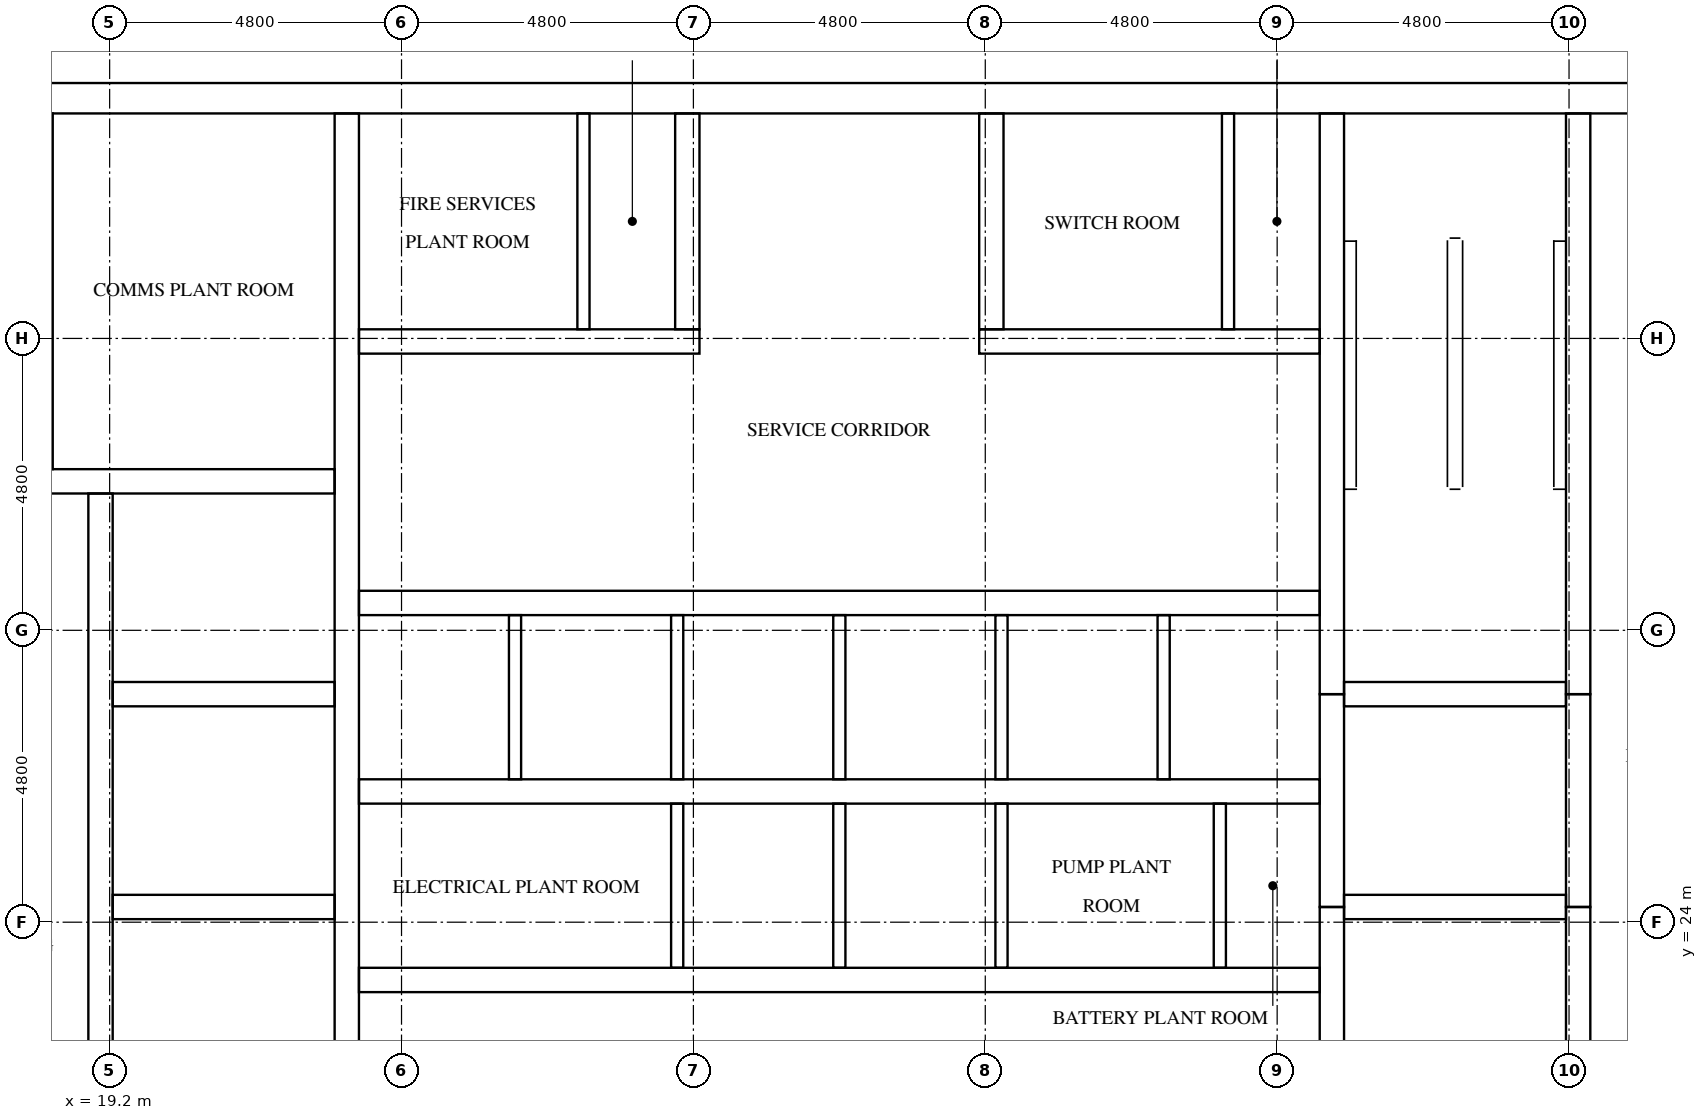
"""IFC4 building model, lengths in metres.
Left out: names, types, materials, properties, quantities, classifications, styles, units other than length and angle.
Written with IfcOpenShell. Run it as: python <this file> out.ifc"""

import sys

from ifc_helpers import new_model, si_unit, direction, frame, frame_2d, origin, place, context, subcontext, project, spatial, rectangle, extrude, element, fill, save


model = new_model("IFC4")
c1 = context("Model", 3, precision=1e-05, world=origin(), true_north=direction((0.0, 1.0)))
c2 = subcontext(c1, "Body", "Model", "MODEL_VIEW")
j1 = project(units=[si_unit("LENGTHUNIT", "METRE"), si_unit("PLANEANGLEUNIT", "RADIAN")], contexts=[c1])
p1 = place(None, origin())
s1 = spatial("IfcSite", under=j1, at=p1, CompositionType="ELEMENT")
p2 = place(p1, origin())
s2 = spatial("IfcBuilding", under=s1, at=p2, CompositionType="ELEMENT")
p3 = place(p2, frame((0.0, 0.0, 296.3)))
s3 = spatial("IfcBuildingStorey", under=s2, at=p3, CompositionType="ELEMENT", Elevation=296.3)
p4 = place(p3, frame((15.0, 37.55, 0.0), z_axis=(0.0, 0.0, 1.0), x_axis=(1.0, 0.0, 0.0)))
e1 = element("IfcWall", 1, at=p4, inside=s3, PredefinedType="SHEAR", context=c2, shape_type="SweptSolid", body=[
    extrude(rectangle(XDim=32.4, YDim=0.5, at=frame_2d((16.2, 0.0))), origin(), (0.0, 0.0, 1.0), 4.4),
])
p5 = place(p4, frame((15.3, 0.0, 0.0)))
e2 = element("IfcOpeningElement", 2, at=p5, cuts=e1, PredefinedType="OPENING", context=c2, shape_type="SweptSolid", body=[
    extrude(rectangle(XDim=1.8, YDim=2.1, at=frame_2d((0.9, 1.05))), frame((0.0, 0.26, 0.0), z_axis=(0.0, -1.0, 0.0), x_axis=(1.0, 0.0, 0.0)), (0.0, 0.0, 1.0), 0.52),
])
p6 = place(p4, frame((1.282, 0.0, 0.0)))
e3 = element("IfcOpeningElement", 3, at=p6, cuts=e1, PredefinedType="OPENING", context=c2, shape_type="SweptSolid", body=[
    extrude(rectangle(XDim=1.0, YDim=2.1, at=frame_2d((0.5, 1.05))), frame((0.0, 0.26, 0.0), z_axis=(0.0, -1.0, 0.0), x_axis=(1.0, 0.0, 0.0)), (0.0, 0.0, 1.0), 0.52),
])
p7 = place(p4, frame((5.082, 0.0, 0.0)))
e4 = element("IfcOpeningElement", 4, at=p7, cuts=e1, PredefinedType="OPENING", context=c2, shape_type="SweptSolid", body=[
    extrude(rectangle(XDim=1.0, YDim=2.1, at=frame_2d((0.5, 1.05))), frame((0.0, 0.26, 0.0), z_axis=(0.0, -1.0, 0.0), x_axis=(1.0, 0.0, 0.0)), (0.0, 0.0, 1.0), 0.52),
])
p8 = place(p3, frame((19.05, 15.5, 0.0), z_axis=(0.0, 0.0, 1.0), x_axis=(0.0, 1.0, 0.0)))
e5 = element("IfcWall", 5, at=p8, inside=s3, PredefinedType="SHEAR", context=c2, shape_type="SweptSolid", body=[
    extrude(rectangle(XDim=15.55, YDim=0.4, at=frame_2d((7.775, 0.0))), origin(), (0.0, 0.0, 1.0), 4.4),
])
p9 = place(p8, frame((9.95, 0.0, 0.0)))
e6 = element("IfcOpeningElement", 6, at=p9, cuts=e5, PredefinedType="OPENING", context=c2, shape_type="SweptSolid", body=[
    extrude(rectangle(XDim=1.1, YDim=2.1, at=frame_2d((0.55, 1.05))), frame((0.0, 0.21, 0.0), z_axis=(0.0, -1.0, 0.0), x_axis=(1.0, 0.0, 0.0)), (0.0, 0.0, 1.0), 0.42),
])
p10 = place(p8, frame((13.45, 0.0, 0.0)))
e7 = element("IfcOpeningElement", 7, at=p10, cuts=e5, PredefinedType="OPENING", context=c2, shape_type="SweptSolid", body=[
    extrude(rectangle(XDim=1.1, YDim=2.1, at=frame_2d((0.55, 1.05))), frame((0.0, 0.21, 0.0), z_axis=(0.0, -1.0, 0.0), x_axis=(1.0, 0.0, 0.0)), (0.0, 0.0, 1.0), 0.42),
])
p11 = place(p8, frame((0.7, 0.0, 0.0)))
e8 = element("IfcOpeningElement", 8, at=p11, cuts=e5, PredefinedType="OPENING", context=c2, shape_type="SweptSolid", body=[
    extrude(rectangle(XDim=1.2, YDim=2.1, at=frame_2d((0.6, 1.05))), frame((0.0, 0.21, 0.0), z_axis=(0.0, -1.0, 0.0), x_axis=(1.0, 0.0, 0.0)), (0.0, 0.0, 1.0), 0.42),
])
p12 = place(p3, frame((23.1, 15.5, 0.0), z_axis=(0.0, 0.0, 1.0), x_axis=(0.0, 1.0, 0.0)))
e9 = element("IfcWall", 9, at=p12, inside=s3, PredefinedType="SHEAR", context=c2, shape_type="SweptSolid", body=[
    extrude(rectangle(XDim=21.8, YDim=0.4, at=frame_2d((10.9, 0.0))), origin(), (0.0, 0.0, 1.0), 4.4),
])
p13 = place(p3, frame((39.3, 15.5, 0.0), z_axis=(0.0, 0.0, 1.0), x_axis=(0.0, 1.0, 0.0)))
e10 = element("IfcWall", 10, at=p13, inside=s3, PredefinedType="SHEAR", context=c2, shape_type="SweptSolid", body=[
    extrude(rectangle(XDim=8.75, YDim=0.4, at=frame_2d((4.375, 0.0))), origin(), (0.0, 0.0, 1.0), 4.4),
])
p14 = place(p3, frame((39.3, 24.25, 0.0), z_axis=(0.0, 0.0, 1.0), x_axis=(0.0, 1.0, 0.0)))
e11 = element("IfcWall", 11, at=p14, inside=s3, PredefinedType="SHEAR", context=c2, shape_type="SweptSolid", body=[
    extrude(rectangle(XDim=3.5, YDim=0.4, at=frame_2d((1.75, 0.0))), origin(), (0.0, 0.0, 1.0), 4.4),
])
p15 = place(p3, frame((39.3, 27.75, 0.0), z_axis=(0.0, 0.0, 1.0), x_axis=(0.0, 1.0, 0.0)))
e12 = element("IfcWall", 12, at=p15, inside=s3, PredefinedType="SHEAR", context=c2, shape_type="SweptSolid", body=[
    extrude(rectangle(XDim=9.55, YDim=0.4, at=frame_2d((4.775, 0.0))), origin(), (0.0, 0.0, 1.0), 4.4),
])
p16 = place(p3, frame((43.35, 15.5, 0.0), z_axis=(0.0, 0.0, 1.0), x_axis=(0.0, 1.0, 0.0)))
e13 = element("IfcWall", 13, at=p16, inside=s3, PredefinedType="SHEAR", context=c2, shape_type="SweptSolid", body=[
    extrude(rectangle(XDim=8.75, YDim=0.4, at=frame_2d((4.375, 0.0))), origin(), (0.0, 0.0, 1.0), 4.4),
])
p17 = place(p16, frame((0.7, 0.0, 0.0)))
e14 = element("IfcOpeningElement", 14, at=p17, cuts=e13, PredefinedType="OPENING", context=c2, shape_type="SweptSolid", body=[
    extrude(rectangle(XDim=1.2, YDim=2.1, at=frame_2d((0.6, 1.05))), frame((0.0, 0.21, 0.0), z_axis=(0.0, -1.0, 0.0), x_axis=(1.0, 0.0, 0.0)), (0.0, 0.0, 1.0), 0.42),
])
p18 = place(p3, frame((43.35, 24.25, 0.0), z_axis=(0.0, 0.0, 1.0), x_axis=(0.0, 1.0, 0.0)))
e15 = element("IfcWall", 15, at=p18, inside=s3, PredefinedType="SHEAR", context=c2, shape_type="SweptSolid", body=[
    extrude(rectangle(XDim=3.5, YDim=0.4, at=frame_2d((1.75, 0.0))), origin(), (0.0, 0.0, 1.0), 4.4),
])
p19 = place(p18, frame((1.2, 0.0, 0.0)))
e16 = element("IfcOpeningElement", 16, at=p19, cuts=e15, PredefinedType="OPENING", context=c2, shape_type="SweptSolid", body=[
    extrude(rectangle(XDim=1.1, YDim=2.1, at=frame_2d((0.55, 1.05))), frame((0.0, 0.21, 0.0), z_axis=(0.0, -1.0, 0.0), x_axis=(1.0, 0.0, 0.0)), (0.0, 0.0, 1.0), 0.42),
])
p20 = place(p3, frame((43.35, 27.75, 0.0), z_axis=(0.0, 0.0, 1.0), x_axis=(0.0, 1.0, 0.0)))
e17 = element("IfcWall", 17, at=p20, inside=s3, PredefinedType="SHEAR", context=c2, shape_type="SweptSolid", body=[
    extrude(rectangle(XDim=9.55, YDim=0.4, at=frame_2d((4.775, 0.0))), origin(), (0.0, 0.0, 1.0), 4.4),
])
p21 = place(p20, frame((7.65, 0.0, 0.0)))
e18 = element("IfcOpeningElement", 18, at=p21, cuts=e17, PredefinedType="OPENING", context=c2, shape_type="SweptSolid", body=[
    extrude(rectangle(XDim=1.2, YDim=2.1, at=frame_2d((0.6, 1.05))), frame((0.0, 0.21, 0.0), z_axis=(0.0, -1.0, 0.0), x_axis=(1.0, 0.0, 0.0)), (0.0, 0.0, 1.0), 0.42),
])
for number, where, z_axis, x_axis in (
    (19, (19.25, 24.25, 0.0), (0.0, 0.0, 1.0), (1.0, 0.0, 0.0)),
    (20, (19.25, 27.75, 0.0), (0.0, 0.0, 1.0), (1.0, 0.0, 0.0)),
):
    element("IfcWall", number, at=place(p3, frame(where, z_axis=z_axis, x_axis=x_axis)), inside=s3, PredefinedType="SHEAR", context=c2, shape_type="SweptSolid", body=[
        extrude(rectangle(XDim=3.65, YDim=0.4, at=frame_2d((1.825, 0.0))), origin(), (0.0, 0.0, 1.0), 4.4),
    ])
p22 = place(p3, frame((15.5, 31.25, 0.0), z_axis=(0.0, 0.0, 1.0), x_axis=(1.0, 0.0, 0.0)))
e21 = element("IfcWall", 21, at=p22, inside=s3, PredefinedType="SHEAR", context=c2, shape_type="SweptSolid", body=[
    extrude(rectangle(XDim=7.4, YDim=0.4, at=frame_2d((3.7, 0.0))), origin(), (0.0, 0.0, 1.0), 4.4),
])
for number, where, z_axis, x_axis in (
    (22, (39.5, 24.25, 0.0), (0.0, 0.0, 1.0), (1.0, 0.0, 0.0)),
    (23, (39.5, 27.75, 0.0), (0.0, 0.0, 1.0), (1.0, 0.0, 0.0)),
):
    element("IfcWall", number, at=place(p3, frame(where, z_axis=z_axis, x_axis=x_axis)), inside=s3, PredefinedType="SHEAR", context=c2, shape_type="SweptSolid", body=[
        extrude(rectangle(XDim=3.65, YDim=0.4, at=frame_2d((1.825, 0.0))), origin(), (0.0, 0.0, 1.0), 4.4),
    ])
p23 = place(p3, frame((23.3, 23.05, 0.0), z_axis=(0.0, 0.0, 1.0), x_axis=(1.0, 0.0, 0.0)))
e24 = element("IfcWall", 24, at=p23, inside=s3, PredefinedType="SHEAR", context=c2, shape_type="SweptSolid", body=[
    extrude(rectangle(XDim=15.8, YDim=0.4, at=frame_2d((7.9, 0.0))), origin(), (0.0, 0.0, 1.0), 4.4),
])
p24 = place(p23, frame((2.067, 0.0, 0.0)))
e25 = element("IfcOpeningElement", 25, at=p24, cuts=e24, PredefinedType="OPENING", context=c2, shape_type="SweptSolid", body=[
    extrude(rectangle(XDim=1.0, YDim=2.1, at=frame_2d((0.5, 1.05))), frame((0.0, 0.21, 0.0), z_axis=(0.0, -1.0, 0.0), x_axis=(1.0, 0.0, 0.0)), (0.0, 0.0, 1.0), 0.42),
])
p25 = place(p23, frame((11.862, 0.0, 0.0)))
e26 = element("IfcOpeningElement", 26, at=p25, cuts=e24, PredefinedType="OPENING", context=c2, shape_type="SweptSolid", body=[
    extrude(rectangle(XDim=1.0, YDim=2.1, at=frame_2d((0.5, 1.05))), frame((0.0, 0.21, 0.0), z_axis=(0.0, -1.0, 0.0), x_axis=(1.0, 0.0, 0.0)), (0.0, 0.0, 1.0), 0.42),
])
p26 = place(p23, frame((14.529, 0.0, 0.0)))
e27 = element("IfcOpeningElement", 27, at=p26, cuts=e24, PredefinedType="OPENING", context=c2, shape_type="SweptSolid", body=[
    extrude(rectangle(XDim=1.0, YDim=2.1, at=frame_2d((0.5, 1.05))), frame((0.0, 0.21, 0.0), z_axis=(0.0, -1.0, 0.0), x_axis=(1.0, 0.0, 0.0)), (0.0, 0.0, 1.0), 0.42),
])
for number, where, z_axis, x_axis in (
    (28, (23.3, 26.15, 0.0), (0.0, 0.0, 1.0), (1.0, 0.0, 0.0)),
    (29, (23.3, 29.25, 0.0), (0.0, 0.0, 1.0), (1.0, 0.0, 0.0)),
):
    element("IfcWall", number, at=place(p3, frame(where, z_axis=z_axis, x_axis=x_axis)), inside=s3, PredefinedType="SHEAR", context=c2, shape_type="SweptSolid", body=[
        extrude(rectangle(XDim=15.8, YDim=0.4, at=frame_2d((7.9, 0.0))), origin(), (0.0, 0.0, 1.0), 4.4),
    ])
p27 = place(p3, frame((23.3, 33.55, 0.0), z_axis=(0.0, 0.0, 1.0), x_axis=(1.0, 0.0, 0.0)))
e30 = element("IfcWall", 30, at=p27, inside=s3, PredefinedType="SHEAR", context=c2, shape_type="SweptSolid", body=[
    extrude(rectangle(XDim=5.6, YDim=0.4, at=frame_2d((2.8, 0.0))), origin(), (0.0, 0.0, 1.0), 4.4),
])
p28 = place(p27, frame((1.296, 0.0, 0.0)))
e31 = element("IfcOpeningElement", 31, at=p28, cuts=e30, PredefinedType="OPENING", context=c2, shape_type="SweptSolid", body=[
    extrude(rectangle(XDim=1.0, YDim=2.1, at=frame_2d((0.5, 1.05))), frame((0.0, 0.21, 0.0), z_axis=(0.0, -1.0, 0.0), x_axis=(1.0, 0.0, 0.0)), (0.0, 0.0, 1.0), 0.42),
])
p29 = place(p27, frame((3.996, 0.0, 0.0)))
e32 = element("IfcOpeningElement", 32, at=p29, cuts=e30, PredefinedType="OPENING", context=c2, shape_type="SweptSolid", body=[
    extrude(rectangle(XDim=1.0, YDim=2.1, at=frame_2d((0.5, 1.05))), frame((0.0, 0.21, 0.0), z_axis=(0.0, -1.0, 0.0), x_axis=(1.0, 0.0, 0.0)), (0.0, 0.0, 1.0), 0.42),
])
p30 = place(p3, frame((33.5, 33.55, 0.0), z_axis=(0.0, 0.0, 1.0), x_axis=(1.0, 0.0, 0.0)))
e33 = element("IfcWall", 33, at=p30, inside=s3, PredefinedType="SHEAR", context=c2, shape_type="SweptSolid", body=[
    extrude(rectangle(XDim=5.6, YDim=0.4, at=frame_2d((2.8, 0.0))), origin(), (0.0, 0.0, 1.0), 4.4),
])
p31 = place(p30, frame((1.696, 0.0, 0.0)))
e34 = element("IfcOpeningElement", 34, at=p31, cuts=e33, PredefinedType="OPENING", context=c2, shape_type="SweptSolid", body=[
    extrude(rectangle(XDim=1.0, YDim=2.1, at=frame_2d((0.5, 1.05))), frame((0.0, 0.21, 0.0), z_axis=(0.0, -1.0, 0.0), x_axis=(1.0, 0.0, 0.0)), (0.0, 0.0, 1.0), 0.42),
])
p32 = place(p30, frame((4.396, 0.0, 0.0)))
e35 = element("IfcOpeningElement", 35, at=p32, cuts=e33, PredefinedType="OPENING", context=c2, shape_type="SweptSolid", body=[
    extrude(rectangle(XDim=1.0, YDim=2.1, at=frame_2d((0.5, 1.05))), frame((0.0, 0.21, 0.0), z_axis=(0.0, -1.0, 0.0), x_axis=(1.0, 0.0, 0.0)), (0.0, 0.0, 1.0), 0.42),
])
for number, where, z_axis, x_axis in (
    (36, (28.7, 33.75, 0.0), (0.0, 0.0, 1.0), (0.0, 1.0, 0.0)),
    (37, (33.7, 33.75, 0.0), (0.0, 0.0, 1.0), (0.0, 1.0, 0.0)),
):
    element("IfcWall", number, at=place(p3, frame(where, z_axis=z_axis, x_axis=x_axis)), inside=s3, PredefinedType="SHEAR", context=c2, shape_type="SweptSolid", body=[
        extrude(rectangle(XDim=3.55, YDim=0.4, at=frame_2d((1.775, 0.0))), origin(), (0.0, 0.0, 1.0), 4.4),
    ])
for number, where, z_axis, x_axis in (
    (38, (25.867, 26.35, 0.0), (0.0, 0.0, 1.0), (0.0, 1.0, 0.0)),
    (39, (28.533, 23.25, 0.0), (0.0, 0.0, 1.0), (0.0, 1.0, 0.0)),
    (40, (28.533, 26.35, 0.0), (0.0, 0.0, 1.0), (0.0, 1.0, 0.0)),
    (41, (31.2, 23.25, 0.0), (0.0, 0.0, 1.0), (0.0, 1.0, 0.0)),
    (42, (31.2, 26.35, 0.0), (0.0, 0.0, 1.0), (0.0, 1.0, 0.0)),
    (43, (33.867, 23.25, 0.0), (0.0, 0.0, 1.0), (0.0, 1.0, 0.0)),
    (44, (33.867, 26.35, 0.0), (0.0, 0.0, 1.0), (0.0, 1.0, 0.0)),
    (45, (36.533, 26.35, 0.0), (0.0, 0.0, 1.0), (0.0, 1.0, 0.0)),
):
    element("IfcWall", number, at=place(p3, frame(where, z_axis=z_axis, x_axis=x_axis)), inside=s3, PredefinedType="SOLIDWALL", context=c2, shape_type="SweptSolid", body=[
        extrude(rectangle(XDim=2.7, YDim=0.2, at=frame_2d((1.35, 0.0))), origin(), (0.0, 0.0, 1.0), 4.4),
    ])
p33 = place(p3, frame((18.164, 31.45, 0.0), z_axis=(0.0, 0.0, 1.0), x_axis=(0.0, 1.0, 0.0)))
e46 = element("IfcWall", 46, at=p33, inside=s3, PredefinedType="PARTITIONING", context=c2, shape_type="SweptSolid", body=[
    extrude(rectangle(XDim=5.85, YDim=0.2, at=frame_2d((2.925, 0.0))), origin(), (0.0, 0.0, 1.0), 4.4),
])
p34 = place(p3, frame((37.457, 23.25, 0.0), z_axis=(0.0, 0.0, 1.0), x_axis=(0.0, 1.0, 0.0)))
e47 = element("IfcWall", 47, at=p34, inside=s3, PredefinedType="PARTITIONING", context=c2, shape_type="SweptSolid", body=[
    extrude(rectangle(XDim=2.7, YDim=0.2, at=frame_2d((1.35, 0.0))), origin(), (0.0, 0.0, 1.0), 4.4),
])
for number, where, z_axis, x_axis in (
    (48, (26.992, 33.75, 0.0), (0.0, 0.0, 1.0), (0.0, 1.0, 0.0)),
    (49, (37.592, 33.75, 0.0), (0.0, 0.0, 1.0), (0.0, 1.0, 0.0)),
):
    element("IfcWall", number, at=place(p3, frame(where, z_axis=z_axis, x_axis=x_axis)), inside=s3, PredefinedType="PARTITIONING", context=c2, shape_type="SweptSolid", body=[
        extrude(rectangle(XDim=3.55, YDim=0.2, at=frame_2d((1.775, 0.0))), origin(), (0.0, 0.0, 1.0), 4.4),
    ])
p35 = place(p9, origin())
e50 = element("IfcDoor", 50, at=p35, inside=s3, OperationType="DOUBLE_DOOR_SLIDING", PredefinedType="DOOR", context=c2, shape_type="SweptSolid", body=[
    extrude(rectangle(XDim=1.1, YDim=2.1, at=frame_2d((0.55, 1.05))), frame((0.0, 0.025, 0.0), z_axis=(0.0, -1.0, 0.0), x_axis=(1.0, 0.0, 0.0)), (0.0, 0.0, 1.0), 0.05),
])
fill(e6, e50)
p36 = place(p10, origin())
e51 = element("IfcDoor", 51, at=p36, inside=s3, OperationType="DOUBLE_DOOR_SLIDING", PredefinedType="DOOR", context=c2, shape_type="SweptSolid", body=[
    extrude(rectangle(XDim=1.1, YDim=2.1, at=frame_2d((0.55, 1.05))), frame((0.0, 0.025, 0.0), z_axis=(0.0, -1.0, 0.0), x_axis=(1.0, 0.0, 0.0)), (0.0, 0.0, 1.0), 0.05),
])
fill(e7, e51)
p37 = place(p19, origin())
e52 = element("IfcDoor", 52, at=p37, inside=s3, OperationType="DOUBLE_DOOR_SLIDING", PredefinedType="DOOR", context=c2, shape_type="SweptSolid", body=[
    extrude(rectangle(XDim=1.1, YDim=2.1, at=frame_2d((0.55, 1.05))), frame((0.0, 0.025, 0.0), z_axis=(0.0, -1.0, 0.0), x_axis=(1.0, 0.0, 0.0)), (0.0, 0.0, 1.0), 0.05),
])
fill(e16, e52)
p38 = place(p21, origin())
e53 = element("IfcDoor", 53, at=p38, inside=s3, OperationType="SINGLE_SWING_LEFT", PredefinedType="DOOR", context=c2, shape_type="SweptSolid", body=[
    extrude(rectangle(XDim=1.2, YDim=2.1, at=frame_2d((0.6, 1.05))), frame((0.0, 0.025, 0.0), z_axis=(0.0, -1.0, 0.0), x_axis=(1.0, 0.0, 0.0)), (0.0, 0.0, 1.0), 0.05),
])
fill(e18, e53)
p39 = place(p5, origin())
e54 = element("IfcDoor", 54, at=p39, inside=s3, OperationType="DOUBLE_DOOR_SINGLE_SWING", PredefinedType="DOOR", context=c2, shape_type="SweptSolid", body=[
    extrude(rectangle(XDim=1.8, YDim=2.1, at=frame_2d((0.9, 1.05))), frame((0.0, 0.025, 0.0), z_axis=(0.0, -1.0, 0.0), x_axis=(1.0, 0.0, 0.0)), (0.0, 0.0, 1.0), 0.05),
])
fill(e2, e54)
p40 = place(p7, origin())
e55 = element("IfcDoor", 55, at=p40, inside=s3, OperationType="SINGLE_SWING_LEFT", PredefinedType="DOOR", context=c2, shape_type="SweptSolid", body=[
    extrude(rectangle(XDim=1.0, YDim=2.1, at=frame_2d((0.5, 1.05))), frame((0.0, 0.025, 0.0), z_axis=(0.0, -1.0, 0.0), x_axis=(1.0, 0.0, 0.0)), (0.0, 0.0, 1.0), 0.05),
])
fill(e4, e55)
p41 = place(p24, frame((1.0, 0.0, 0.0), z_axis=(0.0, 0.0, 1.0), x_axis=(-1.0, 0.0, 0.0)))
e56 = element("IfcDoor", 56, at=p41, inside=s3, OperationType="SINGLE_SWING_RIGHT", PredefinedType="DOOR", context=c2, shape_type="SweptSolid", body=[
    extrude(rectangle(XDim=1.0, YDim=2.1, at=frame_2d((0.5, 1.05))), frame((0.0, 0.025, 0.0), z_axis=(0.0, -1.0, 0.0), x_axis=(1.0, 0.0, 0.0)), (0.0, 0.0, 1.0), 0.05),
])
fill(e25, e56)
p42 = place(p25, frame((1.0, 0.0, 0.0), z_axis=(0.0, 0.0, 1.0), x_axis=(-1.0, 0.0, 0.0)))
e57 = element("IfcDoor", 57, at=p42, inside=s3, OperationType="SINGLE_SWING_LEFT", PredefinedType="DOOR", context=c2, shape_type="SweptSolid", body=[
    extrude(rectangle(XDim=1.0, YDim=2.1, at=frame_2d((0.5, 1.05))), frame((0.0, 0.025, 0.0), z_axis=(0.0, -1.0, 0.0), x_axis=(1.0, 0.0, 0.0)), (0.0, 0.0, 1.0), 0.05),
])
fill(e26, e57)
p43 = place(p26, frame((1.0, 0.0, 0.0), z_axis=(0.0, 0.0, 1.0), x_axis=(-1.0, 0.0, 0.0)))
e58 = element("IfcDoor", 58, at=p43, inside=s3, OperationType="SINGLE_SWING_RIGHT", PredefinedType="DOOR", context=c2, shape_type="SweptSolid", body=[
    extrude(rectangle(XDim=1.0, YDim=2.1, at=frame_2d((0.5, 1.05))), frame((0.0, 0.025, 0.0), z_axis=(0.0, -1.0, 0.0), x_axis=(1.0, 0.0, 0.0)), (0.0, 0.0, 1.0), 0.05),
])
fill(e27, e58)
p44 = place(p28, frame((1.0, 0.0, 0.0), z_axis=(0.0, 0.0, 1.0), x_axis=(-1.0, 0.0, 0.0)))
e59 = element("IfcDoor", 59, at=p44, inside=s3, OperationType="SINGLE_SWING_LEFT", PredefinedType="DOOR", context=c2, shape_type="SweptSolid", body=[
    extrude(rectangle(XDim=1.0, YDim=2.1, at=frame_2d((0.5, 1.05))), frame((0.0, 0.025, 0.0), z_axis=(0.0, -1.0, 0.0), x_axis=(1.0, 0.0, 0.0)), (0.0, 0.0, 1.0), 0.05),
])
fill(e31, e59)
p45 = place(p29, frame((1.0, 0.0, 0.0), z_axis=(0.0, 0.0, 1.0), x_axis=(-1.0, 0.0, 0.0)))
e60 = element("IfcDoor", 60, at=p45, inside=s3, OperationType="SINGLE_SWING_RIGHT", PredefinedType="DOOR", context=c2, shape_type="SweptSolid", body=[
    extrude(rectangle(XDim=1.0, YDim=2.1, at=frame_2d((0.5, 1.05))), frame((0.0, 0.025, 0.0), z_axis=(0.0, -1.0, 0.0), x_axis=(1.0, 0.0, 0.0)), (0.0, 0.0, 1.0), 0.05),
])
fill(e32, e60)
p46 = place(p31, frame((1.0, 0.0, 0.0), z_axis=(0.0, 0.0, 1.0), x_axis=(-1.0, 0.0, 0.0)))
e61 = element("IfcDoor", 61, at=p46, inside=s3, OperationType="SINGLE_SWING_LEFT", PredefinedType="DOOR", context=c2, shape_type="SweptSolid", body=[
    extrude(rectangle(XDim=1.0, YDim=2.1, at=frame_2d((0.5, 1.05))), frame((0.0, 0.025, 0.0), z_axis=(0.0, -1.0, 0.0), x_axis=(1.0, 0.0, 0.0)), (0.0, 0.0, 1.0), 0.05),
])
fill(e34, e61)
p47 = place(p32, frame((1.0, 0.0, 0.0), z_axis=(0.0, 0.0, 1.0), x_axis=(-1.0, 0.0, 0.0)))
e62 = element("IfcDoor", 62, at=p47, inside=s3, OperationType="SINGLE_SWING_RIGHT", PredefinedType="DOOR", context=c2, shape_type="SweptSolid", body=[
    extrude(rectangle(XDim=1.0, YDim=2.1, at=frame_2d((0.5, 1.05))), frame((0.0, 0.025, 0.0), z_axis=(0.0, -1.0, 0.0), x_axis=(1.0, 0.0, 0.0)), (0.0, 0.0, 1.0), 0.05),
])
fill(e35, e62)
save(model, sys.argv[1])
